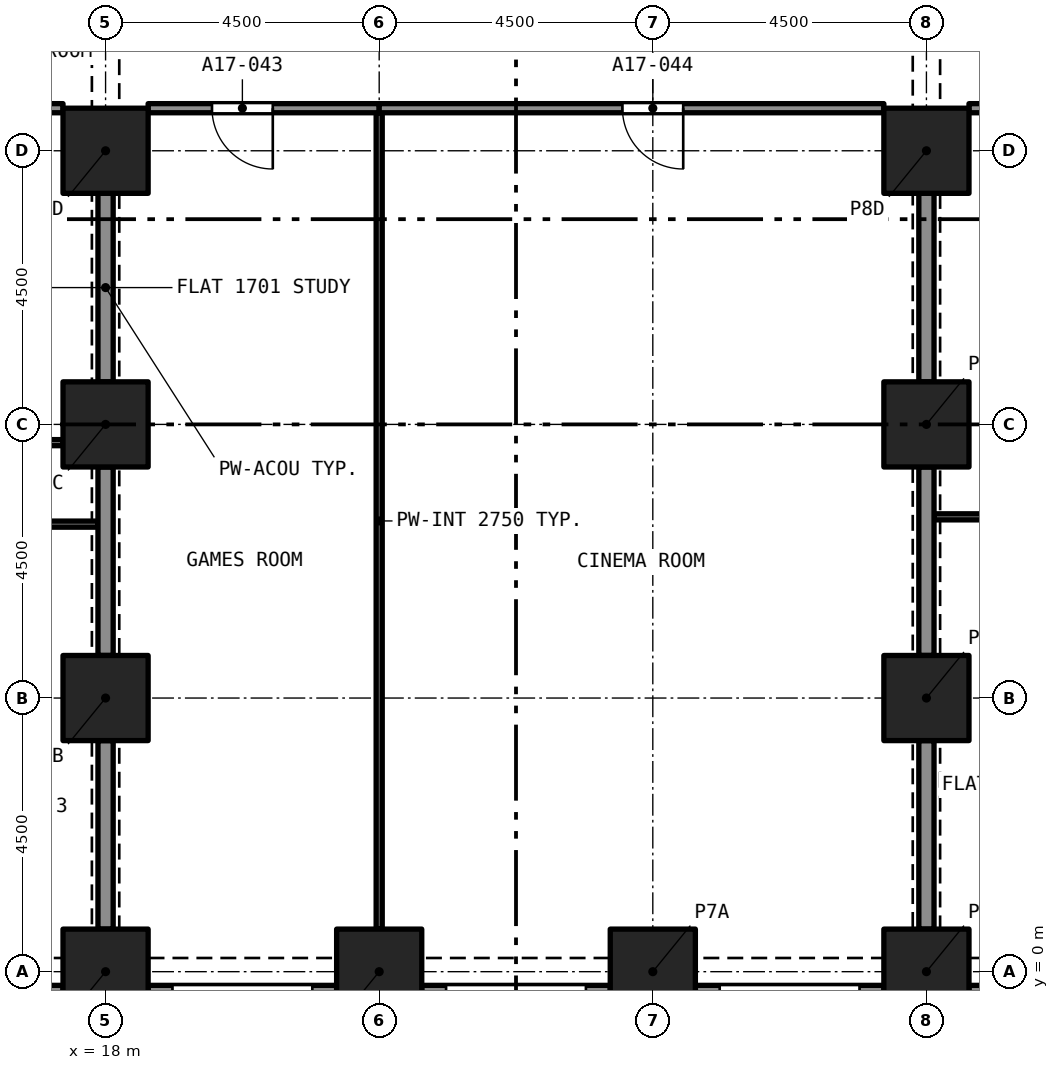
"""IFC4 building model, lengths in metres.
Left out: names, types, materials, properties, quantities, classifications, styles, units other than length and angle.
Written with IfcOpenShell. Run it as: python <this file> out.ifc"""

import sys

from ifc_helpers import new_model, si_unit, direction, frame, frame_2d, origin, origin_2d, place, context, subcontext, project, spatial, rectangle, extrude, element, fill, save


model = new_model("IFC4")
c1 = context("Model", 3, precision=1e-05, world=origin(), true_north=direction((0.0, 1.0)))
c2 = subcontext(c1, "Body", "Model", "MODEL_VIEW")
j1 = project(units=[si_unit("LENGTHUNIT", "METRE"), si_unit("PLANEANGLEUNIT", "RADIAN")], contexts=[c1])
p1 = place(None, origin())
s1 = spatial("IfcSite", under=j1, at=p1, CompositionType="ELEMENT")
p2 = place(p1, origin())
s2 = spatial("IfcBuilding", under=s1, at=p2, CompositionType="ELEMENT")
p3 = place(p2, frame((0.0, 0.0, 65.6)))
s3 = spatial("IfcBuildingStorey", under=s2, at=p3, CompositionType="ELEMENT", Elevation=65.6)
for number, where, z_axis, x_axis in (
    (1, (18.0, 0.0, 0.0), (0.0, 0.0, 1.0), (1.0, 0.0, 0.0)),
    (2, (22.5, 0.0, 0.0), (0.0, 0.0, 1.0), (1.0, 0.0, 0.0)),
    (3, (27.0, 0.0, 0.0), (0.0, 0.0, 1.0), (1.0, 0.0, 0.0)),
    (4, (31.5, 0.0, 0.0), (0.0, 0.0, 1.0), (1.0, 0.0, 0.0)),
    (5, (18.0, 4.5, 0.0), (0.0, 0.0, 1.0), (1.0, 0.0, 0.0)),
    (6, (31.5, 4.5, 0.0), (0.0, 0.0, 1.0), (1.0, 0.0, 0.0)),
    (7, (18.0, 9.0, 0.0), (0.0, 0.0, 1.0), (1.0, 0.0, 0.0)),
    (8, (31.5, 9.0, 0.0), (0.0, 0.0, 1.0), (1.0, 0.0, 0.0)),
    (9, (18.0, 13.5, 0.0), (0.0, 0.0, 1.0), (1.0, 0.0, 0.0)),
    (10, (31.5, 13.5, 0.0), (0.0, 0.0, 1.0), (1.0, 0.0, 0.0)),
):
    element("IfcColumn", number, at=place(p3, frame(where, z_axis=z_axis, x_axis=x_axis)), inside=s3, PredefinedType="COLUMN", context=c2, shape_type="SweptSolid", body=[
        extrude(rectangle(XDim=1.4, YDim=1.4, at=origin_2d()), origin(), (0.0, 0.0, 1.0), 3.2),
    ])
p4 = place(p3, frame((17.3, -0.375, 0.0), z_axis=(0.0, 0.0, 1.0), x_axis=(-1.0, 0.0, 0.0)))
e11 = element("IfcWall", 11, at=p4, inside=s3, PredefinedType="SOLIDWALL", context=c2, shape_type="SweptSolid", body=[
    extrude(rectangle(XDim=3.1, YDim=0.3, at=frame_2d((1.55, 0.0))), origin(), (0.0, 0.0, 1.0), 3.2),
])
p5 = place(p4, frame((0.4, 0.0, 0.45)))
e12 = element("IfcOpeningElement", 12, at=p5, cuts=e11, PredefinedType="OPENING", context=c2, shape_type="SweptSolid", body=[
    extrude(rectangle(XDim=2.3, YDim=1.95, at=frame_2d((1.15, 0.975))), frame((0.0, 0.16, 0.0), z_axis=(0.0, -1.0, 0.0), x_axis=(1.0, 0.0, 0.0)), (0.0, 0.0, 1.0), 0.32),
])
p6 = place(p3, frame((21.8, -0.375, 0.0), z_axis=(0.0, 0.0, 1.0), x_axis=(-1.0, 0.0, 0.0)))
e13 = element("IfcWall", 13, at=p6, inside=s3, PredefinedType="SOLIDWALL", context=c2, shape_type="SweptSolid", body=[
    extrude(rectangle(XDim=3.1, YDim=0.3, at=frame_2d((1.55, 0.0))), origin(), (0.0, 0.0, 1.0), 3.2),
])
p7 = place(p6, frame((0.4, 0.0, 0.45)))
e14 = element("IfcOpeningElement", 14, at=p7, cuts=e13, PredefinedType="OPENING", context=c2, shape_type="SweptSolid", body=[
    extrude(rectangle(XDim=2.3, YDim=1.95, at=frame_2d((1.15, 0.975))), frame((0.0, 0.16, 0.0), z_axis=(0.0, -1.0, 0.0), x_axis=(1.0, 0.0, 0.0)), (0.0, 0.0, 1.0), 0.32),
])
p8 = place(p3, frame((26.3, -0.375, 0.0), z_axis=(0.0, 0.0, 1.0), x_axis=(-1.0, 0.0, 0.0)))
e15 = element("IfcWall", 15, at=p8, inside=s3, PredefinedType="SOLIDWALL", context=c2, shape_type="SweptSolid", body=[
    extrude(rectangle(XDim=3.1, YDim=0.3, at=frame_2d((1.55, 0.0))), origin(), (0.0, 0.0, 1.0), 3.2),
])
p9 = place(p8, frame((0.4, 0.0, 0.45)))
e16 = element("IfcOpeningElement", 16, at=p9, cuts=e15, PredefinedType="OPENING", context=c2, shape_type="SweptSolid", body=[
    extrude(rectangle(XDim=2.3, YDim=1.95, at=frame_2d((1.15, 0.975))), frame((0.0, 0.16, 0.0), z_axis=(0.0, -1.0, 0.0), x_axis=(1.0, 0.0, 0.0)), (0.0, 0.0, 1.0), 0.32),
])
p10 = place(p3, frame((30.8, -0.375, 0.0), z_axis=(0.0, 0.0, 1.0), x_axis=(-1.0, 0.0, 0.0)))
e17 = element("IfcWall", 17, at=p10, inside=s3, PredefinedType="SOLIDWALL", context=c2, shape_type="SweptSolid", body=[
    extrude(rectangle(XDim=3.1, YDim=0.3, at=frame_2d((1.55, 0.0))), origin(), (0.0, 0.0, 1.0), 3.2),
])
p11 = place(p10, frame((0.4, 0.0, 0.45)))
e18 = element("IfcOpeningElement", 18, at=p11, cuts=e17, PredefinedType="OPENING", context=c2, shape_type="SweptSolid", body=[
    extrude(rectangle(XDim=2.3, YDim=1.95, at=frame_2d((1.15, 0.975))), frame((0.0, 0.16, 0.0), z_axis=(0.0, -1.0, 0.0), x_axis=(1.0, 0.0, 0.0)), (0.0, 0.0, 1.0), 0.32),
])
p12 = place(p3, frame((35.3, -0.375, 0.0), z_axis=(0.0, 0.0, 1.0), x_axis=(-1.0, 0.0, 0.0)))
e19 = element("IfcWall", 19, at=p12, inside=s3, PredefinedType="SOLIDWALL", context=c2, shape_type="SweptSolid", body=[
    extrude(rectangle(XDim=3.1, YDim=0.3, at=frame_2d((1.55, 0.0))), origin(), (0.0, 0.0, 1.0), 3.2),
])
p13 = place(p12, frame((0.4, 0.0, 0.45)))
e20 = element("IfcOpeningElement", 20, at=p13, cuts=e19, PredefinedType="OPENING", context=c2, shape_type="SweptSolid", body=[
    extrude(rectangle(XDim=2.3, YDim=1.95, at=frame_2d((1.15, 0.975))), frame((0.0, 0.16, 0.0), z_axis=(0.0, -1.0, 0.0), x_axis=(1.0, 0.0, 0.0)), (0.0, 0.0, 1.0), 0.32),
])
p14 = place(p3, frame((8.55, 14.2, 0.0), z_axis=(0.0, 0.0, 1.0), x_axis=(1.0, 0.0, 0.0)))
e21 = element("IfcWall", 21, at=p14, inside=s3, PredefinedType="PARTITIONING", context=c2, shape_type="SweptSolid", body=[
    extrude(rectangle(XDim=8.75, YDim=0.15, at=frame_2d((4.375, 0.0))), origin(), (0.0, 0.0, 1.0), 2.9),
])
p15 = place(p3, frame((17.875, 7.36, 0.0), z_axis=(0.0, 0.0, 1.0), x_axis=(-1.0, 0.0, 0.0)))
e22 = element("IfcWall", 22, at=p15, inside=s3, PredefinedType="PARTITIONING", context=c2, shape_type="SweptSolid", body=[
    extrude(rectangle(XDim=4.375, YDim=0.1, at=frame_2d((2.188, 0.0))), origin(), (0.0, 0.0, 1.0), 2.9),
])
p16 = place(p15, frame((1.675, 0.0, 0.0)))
e23 = element("IfcOpeningElement", 23, at=p16, cuts=e22, PredefinedType="OPENING", context=c2, shape_type="SweptSolid", body=[
    extrude(rectangle(XDim=0.9, YDim=2.1, at=frame_2d((0.45, 1.05))), frame((0.0, 0.06, 0.0), z_axis=(0.0, -1.0, 0.0), x_axis=(1.0, 0.0, 0.0)), (0.0, 0.0, 1.0), 0.12),
])
for number, where, z_axis, x_axis in (
    (24, (18.0, 5.2, 0.0), (0.0, 0.0, 1.0), (0.0, 1.0, 0.0)),
    (25, (18.0, 0.7, 0.0), (0.0, 0.0, 1.0), (0.0, 1.0, 0.0)),
):
    element("IfcWall", number, at=place(p3, frame(where, z_axis=z_axis, x_axis=x_axis)), inside=s3, PredefinedType="PARTITIONING", context=c2, shape_type="SweptSolid", body=[
        extrude(rectangle(XDim=3.1, YDim=0.25, at=frame_2d((1.55, 0.0))), origin(), (0.0, 0.0, 1.0), 2.38),
    ])
p17 = place(p3, frame((14.771, 8.7, 0.0), z_axis=(0.0, 0.0, 1.0), x_axis=(1.0, 0.0, 0.0)))
e26 = element("IfcWall", 26, at=p17, inside=s3, PredefinedType="PARTITIONING", context=c2, shape_type="SweptSolid", body=[
    extrude(rectangle(XDim=2.529, YDim=0.1, at=frame_2d((1.265, 0.0))), origin(), (0.0, 0.0, 1.0), 2.9),
])
p18 = place(p17, frame((1.165, 0.0, 0.0)))
e27 = element("IfcOpeningElement", 27, at=p18, cuts=e26, PredefinedType="OPENING", context=c2, shape_type="SweptSolid", body=[
    extrude(rectangle(XDim=0.9, YDim=2.1, at=frame_2d((0.45, 1.05))), frame((0.0, 0.06, 0.0), z_axis=(0.0, -1.0, 0.0), x_axis=(1.0, 0.0, 0.0)), (0.0, 0.0, 1.0), 0.12),
])
p19 = place(p3, frame((18.0, 9.7, 0.0), z_axis=(0.0, 0.0, 1.0), x_axis=(0.0, 1.0, 0.0)))
e28 = element("IfcWall", 28, at=p19, inside=s3, PredefinedType="PARTITIONING", context=c2, shape_type="SweptSolid", body=[
    extrude(rectangle(XDim=3.1, YDim=0.25, at=frame_2d((1.55, 0.0))), origin(), (0.0, 0.0, 1.0), 2.38),
])
p20 = place(p3, frame((36.0, 7.48, 0.0), z_axis=(0.0, 0.0, 1.0), x_axis=(-1.0, 0.0, 0.0)))
e29 = element("IfcWall", 29, at=p20, inside=s3, PredefinedType="PARTITIONING", context=c2, shape_type="SweptSolid", body=[
    extrude(rectangle(XDim=4.375, YDim=0.1, at=frame_2d((2.188, 0.0))), origin(), (0.0, 0.0, 1.0), 2.9),
])
p21 = place(p20, frame((1.75, 0.0, 0.0)))
e30 = element("IfcOpeningElement", 30, at=p21, cuts=e29, PredefinedType="OPENING", context=c2, shape_type="SweptSolid", body=[
    extrude(rectangle(XDim=1.0, YDim=2.1, at=frame_2d((0.5, 1.05))), frame((0.0, 0.06, 0.0), z_axis=(0.0, -1.0, 0.0), x_axis=(1.0, 0.0, 0.0)), (0.0, 0.0, 1.0), 0.12),
])
p22 = place(p3, frame((31.5, 9.7, 0.0), z_axis=(0.0, 0.0, 1.0), x_axis=(0.0, 1.0, 0.0)))
e31 = element("IfcWall", 31, at=p22, inside=s3, PredefinedType="PARTITIONING", context=c2, shape_type="SweptSolid", body=[
    extrude(rectangle(XDim=3.1, YDim=0.25, at=frame_2d((1.55, 0.0))), origin(), (0.0, 0.0, 1.0), 2.38),
])
p23 = place(p3, frame((34.425, 14.2, 0.0), z_axis=(0.0, 0.0, 1.0), x_axis=(-1.0, 0.0, 0.0)))
e32 = element("IfcWall", 32, at=p23, inside=s3, PredefinedType="PARTITIONING", context=c2, shape_type="SweptSolid", body=[
    extrude(rectangle(XDim=2.225, YDim=0.15, at=frame_2d((1.113, 0.0))), origin(), (0.0, 0.0, 1.0), 2.9),
])
p24 = place(p23, frame((0.175, 0.0, 0.0)))
e33 = element("IfcOpeningElement", 33, at=p24, cuts=e32, PredefinedType="OPENING", context=c2, shape_type="SweptSolid", body=[
    extrude(rectangle(XDim=1.0, YDim=2.1, at=frame_2d((0.5, 1.05))), frame((0.0, 0.085, 0.0), z_axis=(0.0, -1.0, 0.0), x_axis=(1.0, 0.0, 0.0)), (0.0, 0.0, 1.0), 0.17),
])
for number, where, z_axis, x_axis in (
    (34, (31.5, 0.7, 0.0), (0.0, 0.0, 1.0), (0.0, 1.0, 0.0)),
    (35, (31.5, 5.2, 0.0), (0.0, 0.0, 1.0), (0.0, 1.0, 0.0)),
):
    element("IfcWall", number, at=place(p3, frame(where, z_axis=z_axis, x_axis=x_axis)), inside=s3, PredefinedType="PARTITIONING", context=c2, shape_type="SweptSolid", body=[
        extrude(rectangle(XDim=3.1, YDim=0.25, at=frame_2d((1.55, 0.0))), origin(), (0.0, 0.0, 1.0), 2.38),
    ])
p25 = place(p3, frame((22.5, 0.7, 0.0), z_axis=(0.0, 0.0, 1.0), x_axis=(0.0, 1.0, 0.0)))
e36 = element("IfcWall", 36, at=p25, inside=s3, PredefinedType="PARTITIONING", context=c2, shape_type="SweptSolid", body=[
    extrude(rectangle(XDim=13.425, YDim=0.1, at=frame_2d((6.712, 0.0))), origin(), (0.0, 0.0, 1.0), 2.75),
])
p26 = place(p3, frame((22.5, 14.2, 0.0), z_axis=(0.0, 0.0, 1.0), x_axis=(-1.0, 0.0, 0.0)))
e37 = element("IfcWall", 37, at=p26, inside=s3, PredefinedType="PARTITIONING", context=c2, shape_type="SweptSolid", body=[
    extrude(rectangle(XDim=3.8, YDim=0.15, at=frame_2d((1.9, 0.0))), origin(), (0.0, 0.0, 1.0), 2.75),
])
p27 = place(p26, frame((1.75, 0.0, 0.0)))
e38 = element("IfcOpeningElement", 38, at=p27, cuts=e37, PredefinedType="OPENING", context=c2, shape_type="SweptSolid", body=[
    extrude(rectangle(XDim=1.0, YDim=2.1, at=frame_2d((0.5, 1.05))), frame((0.0, 0.085, 0.0), z_axis=(0.0, -1.0, 0.0), x_axis=(1.0, 0.0, 0.0)), (0.0, 0.0, 1.0), 0.17),
])
p28 = place(p3, frame((30.8, 14.2, 0.0), z_axis=(0.0, 0.0, 1.0), x_axis=(-1.0, 0.0, 0.0)))
e39 = element("IfcWall", 39, at=p28, inside=s3, PredefinedType="PARTITIONING", context=c2, shape_type="SweptSolid", body=[
    extrude(rectangle(XDim=8.3, YDim=0.15, at=frame_2d((4.15, 0.0))), origin(), (0.0, 0.0, 1.0), 2.75),
])
p29 = place(p28, frame((3.3, 0.0, 0.0)))
e40 = element("IfcOpeningElement", 40, at=p29, cuts=e39, PredefinedType="OPENING", context=c2, shape_type="SweptSolid", body=[
    extrude(rectangle(XDim=1.0, YDim=2.1, at=frame_2d((0.5, 1.05))), frame((0.0, 0.085, 0.0), z_axis=(0.0, -1.0, 0.0), x_axis=(1.0, 0.0, 0.0)), (0.0, 0.0, 1.0), 0.17),
])
p30 = place(p27, origin())
e41 = element("IfcDoor", 41, at=p30, inside=s3, OperationType="SINGLE_SWING_RIGHT", PredefinedType="DOOR", context=c2, shape_type="SweptSolid", body=[
    extrude(rectangle(XDim=1.0, YDim=2.1, at=frame_2d((0.5, 1.05))), frame((0.0, 0.025, 0.0), z_axis=(0.0, -1.0, 0.0), x_axis=(1.0, 0.0, 0.0)), (0.0, 0.0, 1.0), 0.05),
])
fill(e38, e41)
p31 = place(p29, origin())
e42 = element("IfcDoor", 42, at=p31, inside=s3, OperationType="SINGLE_SWING_LEFT", PredefinedType="DOOR", context=c2, shape_type="SweptSolid", body=[
    extrude(rectangle(XDim=1.0, YDim=2.1, at=frame_2d((0.5, 1.05))), frame((0.0, 0.025, 0.0), z_axis=(0.0, -1.0, 0.0), x_axis=(1.0, 0.0, 0.0)), (0.0, 0.0, 1.0), 0.05),
])
fill(e40, e42)
save(model, sys.argv[1])
